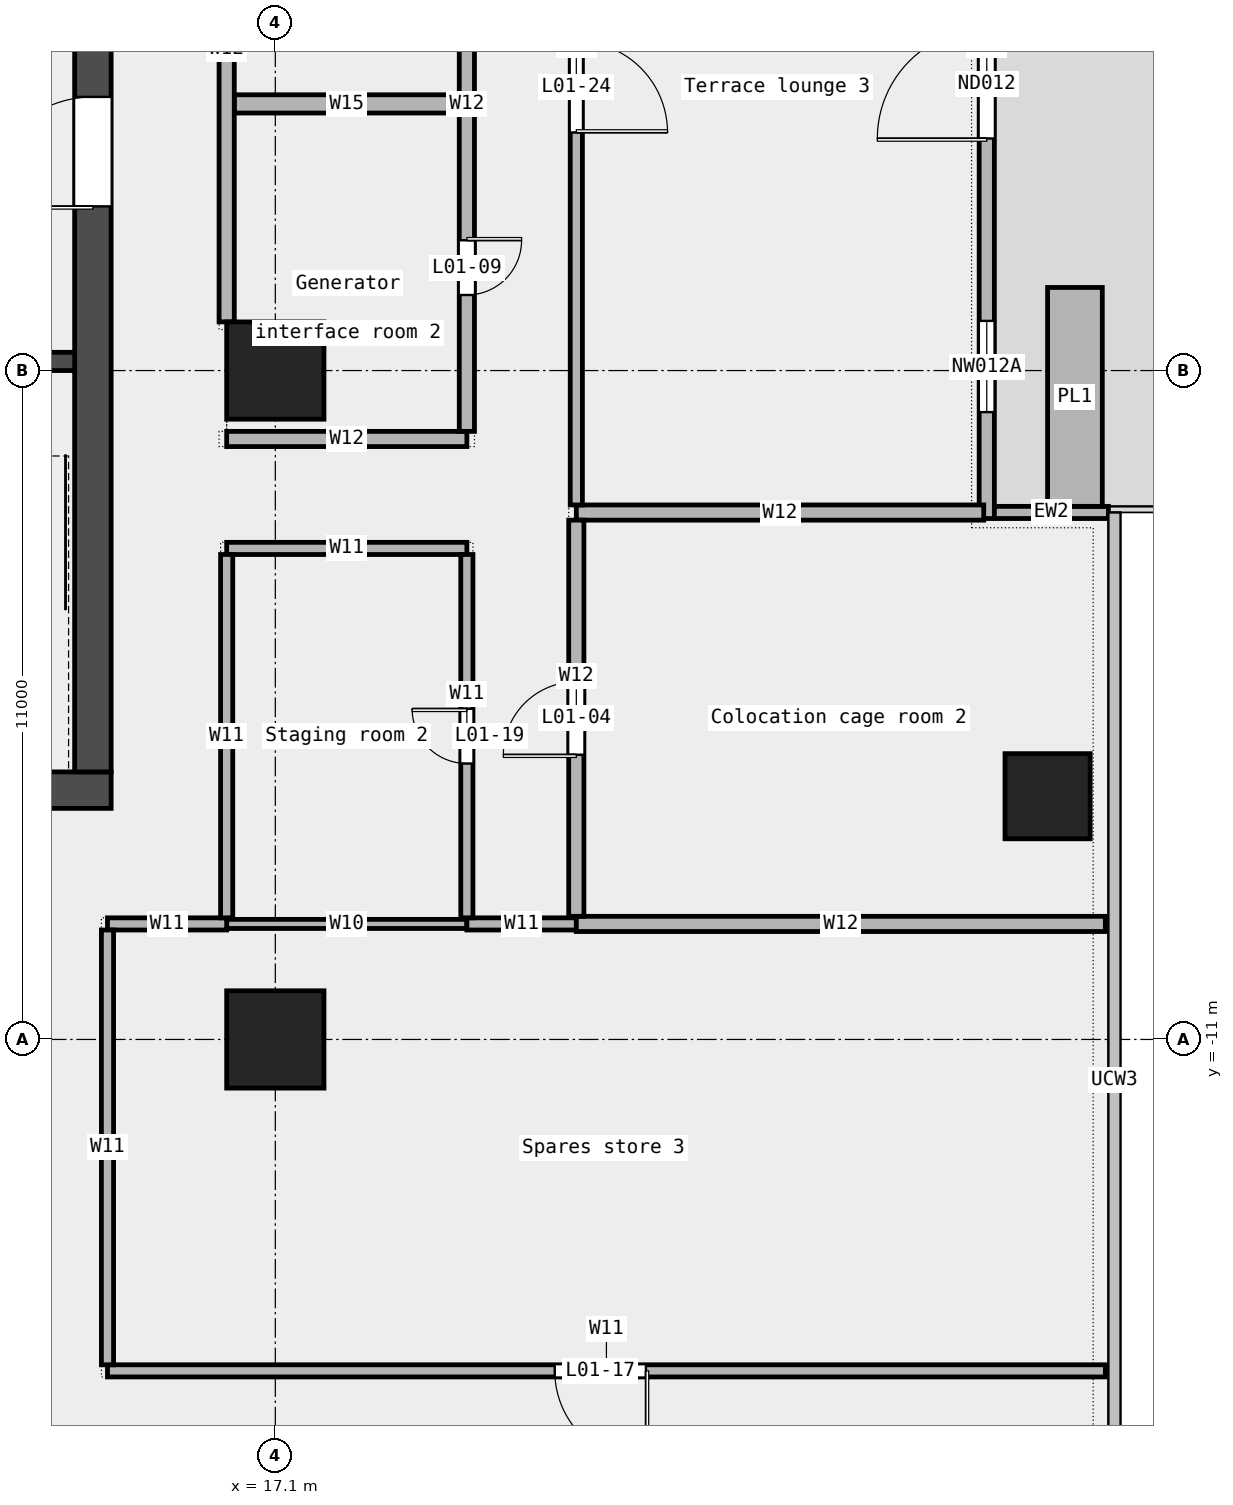
"""IFC4 building model, lengths in metres.
Left out: names, types, materials, properties, quantities, classifications, styles, units other than length and angle.
Written with IfcOpenShell. Run it as: python <this file> out.ifc"""

import sys

from ifc_helpers import new_model, si_unit, direction, frame, frame_2d, origin, origin_2d, place, context, subcontext, project, spatial, rectangle, extrude, element, fill, save


model = new_model("IFC4")
c1 = context("Model", 3, precision=1e-05, world=origin(), true_north=direction((0.0, 1.0)))
c2 = subcontext(c1, "Body", "Model", "MODEL_VIEW")
j1 = project(units=[si_unit("LENGTHUNIT", "METRE"), si_unit("PLANEANGLEUNIT", "RADIAN")], contexts=[c1])
p1 = place(None, origin())
s1 = spatial("IfcSite", under=j1, at=p1, CompositionType="ELEMENT")
p2 = place(p1, origin())
s2 = spatial("IfcBuilding", under=s1, at=p2, CompositionType="ELEMENT")
p3 = place(p2, frame((0.0, 0.0, 9.0)))
s3 = spatial("IfcBuildingStorey", under=s2, at=p3, CompositionType="ELEMENT", Elevation=9.0)
p4 = place(p3, frame((29.8, -7.0, 0.0), z_axis=(0.0, 0.0, 1.0), x_axis=(1.0, 0.0, 0.0)))
e1 = element("IfcColumn", 1, at=p4, inside=s3, PredefinedType="COLUMN", context=c2, shape_type="SweptSolid", body=[
    extrude(rectangle(XDim=1.4, YDim=1.4, at=origin_2d()), origin(), (0.0, 0.0, 1.0), 5.0),
])
for number, where, z_axis, x_axis in (
    (2, (17.1, -11.0, 0.0), (0.0, 0.0, 1.0), (1.0, 0.0, 0.0)),
    (3, (17.1, 0.0, 0.0), (0.0, 0.0, 1.0), (1.0, 0.0, 0.0)),
):
    element("IfcColumn", number, at=place(p3, frame(where, z_axis=z_axis, x_axis=x_axis)), inside=s3, PredefinedType="COLUMN", context=c2, shape_type="SweptSolid", body=[
        extrude(rectangle(XDim=1.6, YDim=1.6, at=origin_2d()), origin(), (0.0, 0.0, 1.0), 5.0),
    ])
p5 = place(p3, frame((28.8, -2.433, 0.0), z_axis=(0.0, 0.0, 1.0), x_axis=(0.0, 1.0, 0.0)))
e4 = element("IfcWall", 4, at=p5, inside=s3, PredefinedType="STANDARD", context=c2, shape_type="SweptSolid", body=[
    extrude(rectangle(XDim=14.2, YDim=0.25, at=frame_2d((7.1, 0.0))), origin(), (0.0, 0.0, 1.0), 5.0),
])
p6 = place(p5, frame((1.75, 0.0, 0.45)))
e5 = element("IfcOpeningElement", 5, at=p6, cuts=e4, PredefinedType="OPENING", context=c2, shape_type="SweptSolid", body=[
    extrude(rectangle(XDim=1.5, YDim=3.0, at=frame_2d((0.75, 1.5))), frame((0.0, 0.137, 0.0), z_axis=(0.0, -1.0, 0.0), x_axis=(1.0, 0.0, 0.0)), (0.0, 0.0, 1.0), 0.274),
])
p7 = place(p5, frame((6.25, 0.0, 0.0)))
e6 = element("IfcOpeningElement", 6, at=p7, cuts=e4, PredefinedType="OPENING", context=c2, shape_type="SweptSolid", body=[
    extrude(rectangle(XDim=1.8, YDim=2.4, at=frame_2d((0.9, 1.2))), frame((0.0, 0.137, 0.0), z_axis=(0.0, -1.0, 0.0), x_axis=(1.0, 0.0, 0.0)), (0.0, 0.0, 1.0), 0.274),
])
p8 = place(p5, frame((11.0, 0.0, 0.45)))
e7 = element("IfcOpeningElement", 7, at=p8, cuts=e4, PredefinedType="OPENING", context=c2, shape_type="SweptSolid", body=[
    extrude(rectangle(XDim=1.5, YDim=3.0, at=frame_2d((0.75, 1.5))), frame((0.0, 0.137, 0.0), z_axis=(0.0, -1.0, 0.0), x_axis=(1.0, 0.0, 0.0)), (0.0, 0.0, 1.0), 0.274),
])
p9 = place(p3, frame((30.8, -2.333, 0.0), z_axis=(0.0, 0.0, 1.0), x_axis=(-1.0, 0.0, 0.0)))
e8 = element("IfcWall", 8, at=p9, inside=s3, PredefinedType="STANDARD", context=c2, shape_type="SweptSolid", body=[
    extrude(rectangle(XDim=1.875, YDim=0.2, at=frame_2d((0.938, 0.0))), origin(), (0.0, 0.0, 1.0), 5.0),
])
p10 = place(p3, frame((30.25, -2.233, 0.0), z_axis=(0.0, 0.0, 1.0), x_axis=(0.0, 1.0, 0.0)))
e9 = element("IfcWall", 9, at=p10, inside=s3, PredefinedType="STANDARD", context=c2, shape_type="SweptSolid", body=[
    extrude(rectangle(XDim=3.6, YDim=0.9, at=frame_2d((1.8, 0.0))), origin(), (0.0, 0.0, 1.0), 0.7),
])
p11 = place(p3, frame((14.34, -16.45, 0.0), z_axis=(0.0, 0.0, 1.0), x_axis=(1.0, 0.0, 0.0)))
e10 = element("IfcWall", 10, at=p11, inside=s3, PredefinedType="PARTITIONING", context=c2, shape_type="SweptSolid", body=[
    extrude(rectangle(XDim=16.41, YDim=0.2, at=frame_2d((8.205, 0.0))), origin(), (0.0, 0.0, 1.0), 5.0),
])
p12 = place(p11, frame((7.355, 0.0, 0.0)))
e11 = element("IfcOpeningElement", 11, at=p12, cuts=e10, PredefinedType="OPENING", context=c2, shape_type="SweptSolid", body=[
    extrude(rectangle(XDim=1.5, YDim=2.1, at=frame_2d((0.75, 1.05))), frame((0.0, 0.112, 0.0), z_axis=(0.0, -1.0, 0.0), x_axis=(1.0, 0.0, 0.0)), (0.0, 0.0, 1.0), 0.224),
])
p13 = place(p3, frame((16.3, -9.1, 0.0), z_axis=(0.0, 0.0, 1.0), x_axis=(1.0, 0.0, 0.0)))
e12 = element("IfcWall", 12, at=p13, inside=s3, PredefinedType="PARTITIONING", context=c2, shape_type="SweptSolid", body=[
    extrude(rectangle(XDim=3.95, YDim=0.15, at=frame_2d((1.975, 0.0))), origin(), (0.0, 0.0, 1.0), 5.0),
])
p14 = place(p3, frame((14.34, -9.1, 0.0), z_axis=(0.0, 0.0, 1.0), x_axis=(1.0, 0.0, 0.0)))
e13 = element("IfcWall", 13, at=p14, inside=s3, PredefinedType="PARTITIONING", context=c2, shape_type="SweptSolid", body=[
    extrude(rectangle(XDim=1.96, YDim=0.2, at=frame_2d((0.98, 0.0))), origin(), (0.0, 0.0, 1.0), 5.0),
])
p15 = place(p3, frame((20.25, -9.1, 0.0), z_axis=(0.0, 0.0, 1.0), x_axis=(1.0, 0.0, 0.0)))
e14 = element("IfcWall", 14, at=p15, inside=s3, PredefinedType="PARTITIONING", context=c2, shape_type="SweptSolid", body=[
    extrude(rectangle(XDim=1.8, YDim=0.2, at=frame_2d((0.9, 0.0))), origin(), (0.0, 0.0, 1.0), 5.0),
])
p16 = place(p3, frame((22.05, -9.1, 0.0), z_axis=(0.0, 0.0, 1.0), x_axis=(1.0, 0.0, 0.0)))
e15 = element("IfcWall", 15, at=p16, inside=s3, PredefinedType="PARTITIONING", context=c2, shape_type="SweptSolid", body=[
    extrude(rectangle(XDim=8.7, YDim=0.25, at=frame_2d((4.35, 0.0))), origin(), (0.0, 0.0, 1.0), 5.0),
])
p17 = place(p3, frame((16.3, -2.925, 0.0), z_axis=(0.0, 0.0, 1.0), x_axis=(1.0, 0.0, 0.0)))
e16 = element("IfcWall", 16, at=p17, inside=s3, PredefinedType="PARTITIONING", context=c2, shape_type="SweptSolid", body=[
    extrude(rectangle(XDim=3.95, YDim=0.2, at=frame_2d((1.975, 0.0))), origin(), (0.0, 0.0, 1.0), 5.0),
])
p18 = place(p3, frame((22.05, -2.335, 0.0), z_axis=(0.0, 0.0, 1.0), x_axis=(1.0, 0.0, 0.0)))
e17 = element("IfcWall", 17, at=p18, inside=s3, PredefinedType="PARTITIONING", context=c2, shape_type="SweptSolid", body=[
    extrude(rectangle(XDim=6.7, YDim=0.25, at=frame_2d((3.35, 0.0))), origin(), (0.0, 0.0, 1.0), 5.0),
])
p19 = place(p3, frame((16.3, -1.125, 0.0), z_axis=(0.0, 0.0, 1.0), x_axis=(1.0, 0.0, 0.0)))
e18 = element("IfcWall", 18, at=p19, inside=s3, PredefinedType="PARTITIONING", context=c2, shape_type="SweptSolid", body=[
    extrude(rectangle(XDim=3.95, YDim=0.25, at=frame_2d((1.975, 0.0))), origin(), (0.0, 0.0, 1.0), 5.0),
])
p20 = place(p3, frame((16.425, 4.385, 0.0), z_axis=(0.0, 0.0, 1.0), x_axis=(1.0, 0.0, 0.0)))
e19 = element("IfcWall", 19, at=p20, inside=s3, PredefinedType="PARTITIONING", context=c2, shape_type="SweptSolid", body=[
    extrude(rectangle(XDim=3.7, YDim=0.3, at=frame_2d((1.85, 0.0))), origin(), (0.0, 0.0, 1.0), 5.0),
])
p21 = place(p3, frame((14.34, -16.35, 0.0), z_axis=(0.0, 0.0, 1.0), x_axis=(0.0, 1.0, 0.0)))
e20 = element("IfcWall", 20, at=p21, inside=s3, PredefinedType="PARTITIONING", context=c2, shape_type="SweptSolid", body=[
    extrude(rectangle(XDim=7.15, YDim=0.2, at=frame_2d((3.575, 0.0))), origin(), (0.0, 0.0, 1.0), 5.0),
])
p22 = place(p3, frame((16.3, -9.0, 0.0), z_axis=(0.0, 0.0, 1.0), x_axis=(0.0, 1.0, 0.0)))
e21 = element("IfcWall", 21, at=p22, inside=s3, PredefinedType="PARTITIONING", context=c2, shape_type="SweptSolid", body=[
    extrude(rectangle(XDim=5.975, YDim=0.2, at=frame_2d((2.988, 0.0))), origin(), (0.0, 0.0, 1.0), 5.0),
])
p23 = place(p3, frame((16.3, 0.8, 0.0), z_axis=(0.0, 0.0, 1.0), x_axis=(0.0, 1.0, 0.0)))
e22 = element("IfcWall", 22, at=p23, inside=s3, PredefinedType="PARTITIONING", context=c2, shape_type="SweptSolid", body=[
    extrude(rectangle(XDim=8.965, YDim=0.25, at=frame_2d((4.482, 0.0))), origin(), (0.0, 0.0, 1.0), 5.0),
])
p24 = place(p3, frame((20.25, -9.0, 0.0), z_axis=(0.0, 0.0, 1.0), x_axis=(0.0, 1.0, 0.0)))
e23 = element("IfcWall", 23, at=p24, inside=s3, PredefinedType="PARTITIONING", context=c2, shape_type="SweptSolid", body=[
    extrude(rectangle(XDim=5.975, YDim=0.2, at=frame_2d((2.988, 0.0))), origin(), (0.0, 0.0, 1.0), 5.0),
])
p25 = place(p24, frame((2.538, 0.0, 0.0)))
e24 = element("IfcOpeningElement", 24, at=p25, cuts=e23, PredefinedType="OPENING", context=c2, shape_type="SweptSolid", body=[
    extrude(rectangle(XDim=0.9, YDim=2.1, at=frame_2d((0.45, 1.05))), frame((0.0, 0.112, 0.0), z_axis=(0.0, -1.0, 0.0), x_axis=(1.0, 0.0, 0.0)), (0.0, 0.0, 1.0), 0.224),
])
p26 = place(p3, frame((20.25, -1.0, 0.0), z_axis=(0.0, 0.0, 1.0), x_axis=(0.0, 1.0, 0.0)))
e25 = element("IfcWall", 25, at=p26, inside=s3, PredefinedType="PARTITIONING", context=c2, shape_type="SweptSolid", body=[
    extrude(rectangle(XDim=10.765, YDim=0.25, at=frame_2d((5.382, 0.0))), origin(), (0.0, 0.0, 1.0), 5.0),
])
p27 = place(p26, frame((2.242, 0.0, 0.0)))
e26 = element("IfcOpeningElement", 26, at=p27, cuts=e25, PredefinedType="OPENING", context=c2, shape_type="SweptSolid", body=[
    extrude(rectangle(XDim=0.9, YDim=2.1, at=frame_2d((0.45, 1.05))), frame((0.0, 0.137, 0.0), z_axis=(0.0, -1.0, 0.0), x_axis=(1.0, 0.0, 0.0)), (0.0, 0.0, 1.0), 0.274),
])
p28 = place(p26, frame((7.625, 0.0, 0.0)))
e27 = element("IfcOpeningElement", 27, at=p28, cuts=e25, PredefinedType="OPENING", context=c2, shape_type="SweptSolid", body=[
    extrude(rectangle(XDim=0.9, YDim=2.1, at=frame_2d((0.45, 1.05))), frame((0.0, 0.137, 0.0), z_axis=(0.0, -1.0, 0.0), x_axis=(1.0, 0.0, 0.0)), (0.0, 0.0, 1.0), 0.274),
])
p29 = place(p3, frame((22.05, -2.21, 0.0), z_axis=(0.0, 0.0, 1.0), x_axis=(0.0, 1.0, 0.0)))
e28 = element("IfcWall", 28, at=p29, inside=s3, PredefinedType="PARTITIONING", context=c2, shape_type="SweptSolid", body=[
    extrude(rectangle(XDim=13.75, YDim=0.2, at=frame_2d((6.875, 0.0))), origin(), (0.0, 0.0, 1.0), 5.0),
])
p30 = place(p29, frame((6.125, 0.0, 0.0)))
e29 = element("IfcOpeningElement", 29, at=p30, cuts=e28, PredefinedType="OPENING", context=c2, shape_type="SweptSolid", body=[
    extrude(rectangle(XDim=1.5, YDim=2.1, at=frame_2d((0.75, 1.05))), frame((0.0, 0.112, 0.0), z_axis=(0.0, -1.0, 0.0), x_axis=(1.0, 0.0, 0.0)), (0.0, 0.0, 1.0), 0.224),
])
p31 = place(p3, frame((22.05, -8.975, 0.0), z_axis=(0.0, 0.0, 1.0), x_axis=(0.0, 1.0, 0.0)))
e30 = element("IfcWall", 30, at=p31, inside=s3, PredefinedType="PARTITIONING", context=c2, shape_type="SweptSolid", body=[
    extrude(rectangle(XDim=6.515, YDim=0.25, at=frame_2d((3.258, 0.0))), origin(), (0.0, 0.0, 1.0), 5.0),
])
p32 = place(p31, frame((2.657, 0.0, 0.0)))
e31 = element("IfcOpeningElement", 31, at=p32, cuts=e30, PredefinedType="OPENING", context=c2, shape_type="SweptSolid", body=[
    extrude(rectangle(XDim=1.2, YDim=2.1, at=frame_2d((0.6, 1.05))), frame((0.0, 0.137, 0.0), z_axis=(0.0, -1.0, 0.0), x_axis=(1.0, 0.0, 0.0)), (0.0, 0.0, 1.0), 0.274),
])
p33 = place(p3, frame((-14.4, -6.9, 0.0), z_axis=(0.0, 0.0, 1.0), x_axis=(1.0, 0.0, 0.0)))
e32 = element("IfcWall", 32, at=p33, inside=s3, PredefinedType="SHEAR", context=c2, shape_type="SweptSolid", body=[
    extrude(rectangle(XDim=28.8, YDim=0.6, at=frame_2d((14.4, 0.0))), origin(), (0.0, 0.0, 1.0), 5.2),
])
p34 = place(p33, frame((4.9, 0.0, 0.0)))
e33 = element("IfcOpeningElement", 33, at=p34, cuts=e32, PredefinedType="OPENING", context=c2, shape_type="SweptSolid", body=[
    extrude(rectangle(XDim=1.0, YDim=2.1, at=frame_2d((0.5, 1.05))), frame((0.0, 0.312, 0.0), z_axis=(0.0, -1.0, 0.0), x_axis=(1.0, 0.0, 0.0)), (0.0, 0.0, 1.0), 0.624),
])
p35 = place(p33, frame((9.675, 0.0, 0.0)))
e34 = element("IfcOpeningElement", 34, at=p35, cuts=e32, PredefinedType="OPENING", context=c2, shape_type="SweptSolid", body=[
    extrude(rectangle(XDim=1.2, YDim=2.1, at=frame_2d((0.6, 1.05))), frame((0.0, 0.312, 0.0), z_axis=(0.0, -1.0, 0.0), x_axis=(1.0, 0.0, 0.0)), (0.0, 0.0, 1.0), 0.624),
])
p36 = place(p33, frame((14.837, 0.0, 0.0)))
e35 = element("IfcOpeningElement", 35, at=p36, cuts=e32, PredefinedType="OPENING", context=c2, shape_type="SweptSolid", body=[
    extrude(rectangle(XDim=1.0, YDim=2.1, at=frame_2d((0.5, 1.05))), frame((0.0, 0.312, 0.0), z_axis=(0.0, -1.0, 0.0), x_axis=(1.0, 0.0, 0.0)), (0.0, 0.0, 1.0), 0.624),
])
p37 = place(p33, frame((18.75, 0.0, 0.0)))
e36 = element("IfcOpeningElement", 36, at=p37, cuts=e32, PredefinedType="OPENING", context=c2, shape_type="SweptSolid", body=[
    extrude(rectangle(XDim=1.8, YDim=2.1, at=frame_2d((0.9, 1.05))), frame((0.0, 0.312, 0.0), z_axis=(0.0, -1.0, 0.0), x_axis=(1.0, 0.0, 0.0)), (0.0, 0.0, 1.0), 0.624),
])
p38 = place(p33, frame((23.087, 0.0, 0.0)))
e37 = element("IfcOpeningElement", 37, at=p38, cuts=e32, PredefinedType="OPENING", context=c2, shape_type="SweptSolid", body=[
    extrude(rectangle(XDim=1.0, YDim=2.1, at=frame_2d((0.5, 1.05))), frame((0.0, 0.312, 0.0), z_axis=(0.0, -1.0, 0.0), x_axis=(1.0, 0.0, 0.0)), (0.0, 0.0, 1.0), 0.624),
])
p39 = place(p3, frame((14.1, -6.6, 0.0), z_axis=(0.0, 0.0, 1.0), x_axis=(0.0, 1.0, 0.0)))
e38 = element("IfcWall", 38, at=p39, inside=s3, PredefinedType="SHEAR", context=c2, shape_type="SweptSolid", body=[
    extrude(rectangle(XDim=19.5, YDim=0.6, at=frame_2d((9.75, 0.0))), origin(), (0.0, 0.0, 1.0), 5.2),
])
p40 = place(p39, frame((9.3, 0.0, 0.0)))
e39 = element("IfcOpeningElement", 39, at=p40, cuts=e38, PredefinedType="OPENING", context=c2, shape_type="SweptSolid", body=[
    extrude(rectangle(XDim=1.8, YDim=2.1, at=frame_2d((0.9, 1.05))), frame((0.0, 0.312, 0.0), z_axis=(0.0, -1.0, 0.0), x_axis=(1.0, 0.0, 0.0)), (0.0, 0.0, 1.0), 0.624),
])
p41 = place(p3, frame((10.65, 0.15, 0.0), z_axis=(0.0, 0.0, 1.0), x_axis=(1.0, 0.0, 0.0)))
e40 = element("IfcWall", 40, at=p41, inside=s3, PredefinedType="SOLIDWALL", context=c2, shape_type="SweptSolid", body=[
    extrude(rectangle(XDim=3.15, YDim=0.3, at=frame_2d((1.575, 0.0))), origin(), (0.0, 0.0, 1.0), 5.2),
])
p42 = place(p41, frame((1.025, 0.0, 0.0)))
e41 = element("IfcOpeningElement", 41, at=p42, cuts=e40, PredefinedType="OPENING", context=c2, shape_type="SweptSolid", body=[
    extrude(rectangle(XDim=1.1, YDim=2.1, at=frame_2d((0.55, 1.05))), frame((0.0, 0.162, 0.0), z_axis=(0.0, -1.0, 0.0), x_axis=(1.0, 0.0, 0.0)), (0.0, 0.0, 1.0), 0.324),
])
p43 = place(p6, origin())
e42 = element("IfcWindow", 42, at=p43, inside=s3, PartitioningType="SINGLE_PANEL", PredefinedType="WINDOW", context=c2, shape_type="SweptSolid", body=[
    extrude(rectangle(XDim=1.5, YDim=3.0, at=frame_2d((0.75, 1.5))), frame((0.0, 0.03, 0.0), z_axis=(0.0, -1.0, 0.0), x_axis=(1.0, 0.0, 0.0)), (0.0, 0.0, 1.0), 0.06),
])
fill(e5, e42)
p44 = place(p7, origin())
e43 = element("IfcDoor", 43, at=p44, inside=s3, OperationType="DOUBLE_DOOR_SINGLE_SWING", PredefinedType="DOOR", context=c2, shape_type="SweptSolid", body=[
    extrude(rectangle(XDim=1.8, YDim=2.4, at=frame_2d((0.9, 1.2))), frame((0.0, 0.025, 0.0), z_axis=(0.0, -1.0, 0.0), x_axis=(1.0, 0.0, 0.0)), (0.0, 0.0, 1.0), 0.05),
])
fill(e6, e43)
p45 = place(p32, origin())
e44 = element("IfcDoor", 44, at=p45, inside=s3, OperationType="SINGLE_SWING_LEFT", PredefinedType="DOOR", context=c2, shape_type="SweptSolid", body=[
    extrude(rectangle(XDim=1.2, YDim=2.1, at=frame_2d((0.6, 1.05))), frame((0.0, 0.025, 0.0), z_axis=(0.0, -1.0, 0.0), x_axis=(1.0, 0.0, 0.0)), (0.0, 0.0, 1.0), 0.05),
])
fill(e31, e44)
p46 = place(p27, origin())
e45 = element("IfcDoor", 45, at=p46, inside=s3, OperationType="SINGLE_SWING_LEFT", PredefinedType="DOOR", context=c2, shape_type="SweptSolid", body=[
    extrude(rectangle(XDim=0.9, YDim=2.1, at=frame_2d((0.45, 1.05))), frame((0.0, 0.025, 0.0), z_axis=(0.0, -1.0, 0.0), x_axis=(1.0, 0.0, 0.0)), (0.0, 0.0, 1.0), 0.05),
])
fill(e26, e45)
p47 = place(p12, origin())
e46 = element("IfcDoor", 46, at=p47, inside=s3, OperationType="DOUBLE_DOOR_SINGLE_SWING", PredefinedType="DOOR", context=c2, shape_type="SweptSolid", body=[
    extrude(rectangle(XDim=1.5, YDim=2.1, at=frame_2d((0.75, 1.05))), frame((0.0, 0.025, 0.0), z_axis=(0.0, -1.0, 0.0), x_axis=(1.0, 0.0, 0.0)), (0.0, 0.0, 1.0), 0.05),
])
fill(e11, e46)
p48 = place(p25, origin())
e47 = element("IfcDoor", 47, at=p48, inside=s3, OperationType="SINGLE_SWING_RIGHT", PredefinedType="DOOR", context=c2, shape_type="SweptSolid", body=[
    extrude(rectangle(XDim=0.9, YDim=2.1, at=frame_2d((0.45, 1.05))), frame((0.0, 0.025, 0.0), z_axis=(0.0, -1.0, 0.0), x_axis=(1.0, 0.0, 0.0)), (0.0, 0.0, 1.0), 0.05),
])
fill(e24, e47)
p49 = place(p30, origin())
e48 = element("IfcDoor", 48, at=p49, inside=s3, OperationType="DOUBLE_DOOR_SINGLE_SWING", PredefinedType="DOOR", context=c2, shape_type="SweptSolid", body=[
    extrude(rectangle(XDim=1.5, YDim=2.1, at=frame_2d((0.75, 1.05))), frame((0.0, 0.025, 0.0), z_axis=(0.0, -1.0, 0.0), x_axis=(1.0, 0.0, 0.0)), (0.0, 0.0, 1.0), 0.05),
])
fill(e29, e48)
p50 = place(p40, origin())
e49 = element("IfcDoor", 49, at=p50, inside=s3, OperationType="DOUBLE_DOOR_SINGLE_SWING", PredefinedType="DOOR", context=c2, shape_type="SweptSolid", body=[
    extrude(rectangle(XDim=1.8, YDim=2.1, at=frame_2d((0.9, 1.05))), frame((0.0, 0.025, 0.0), z_axis=(0.0, -1.0, 0.0), x_axis=(1.0, 0.0, 0.0)), (0.0, 0.0, 1.0), 0.05),
])
fill(e39, e49)
save(model, sys.argv[1])
